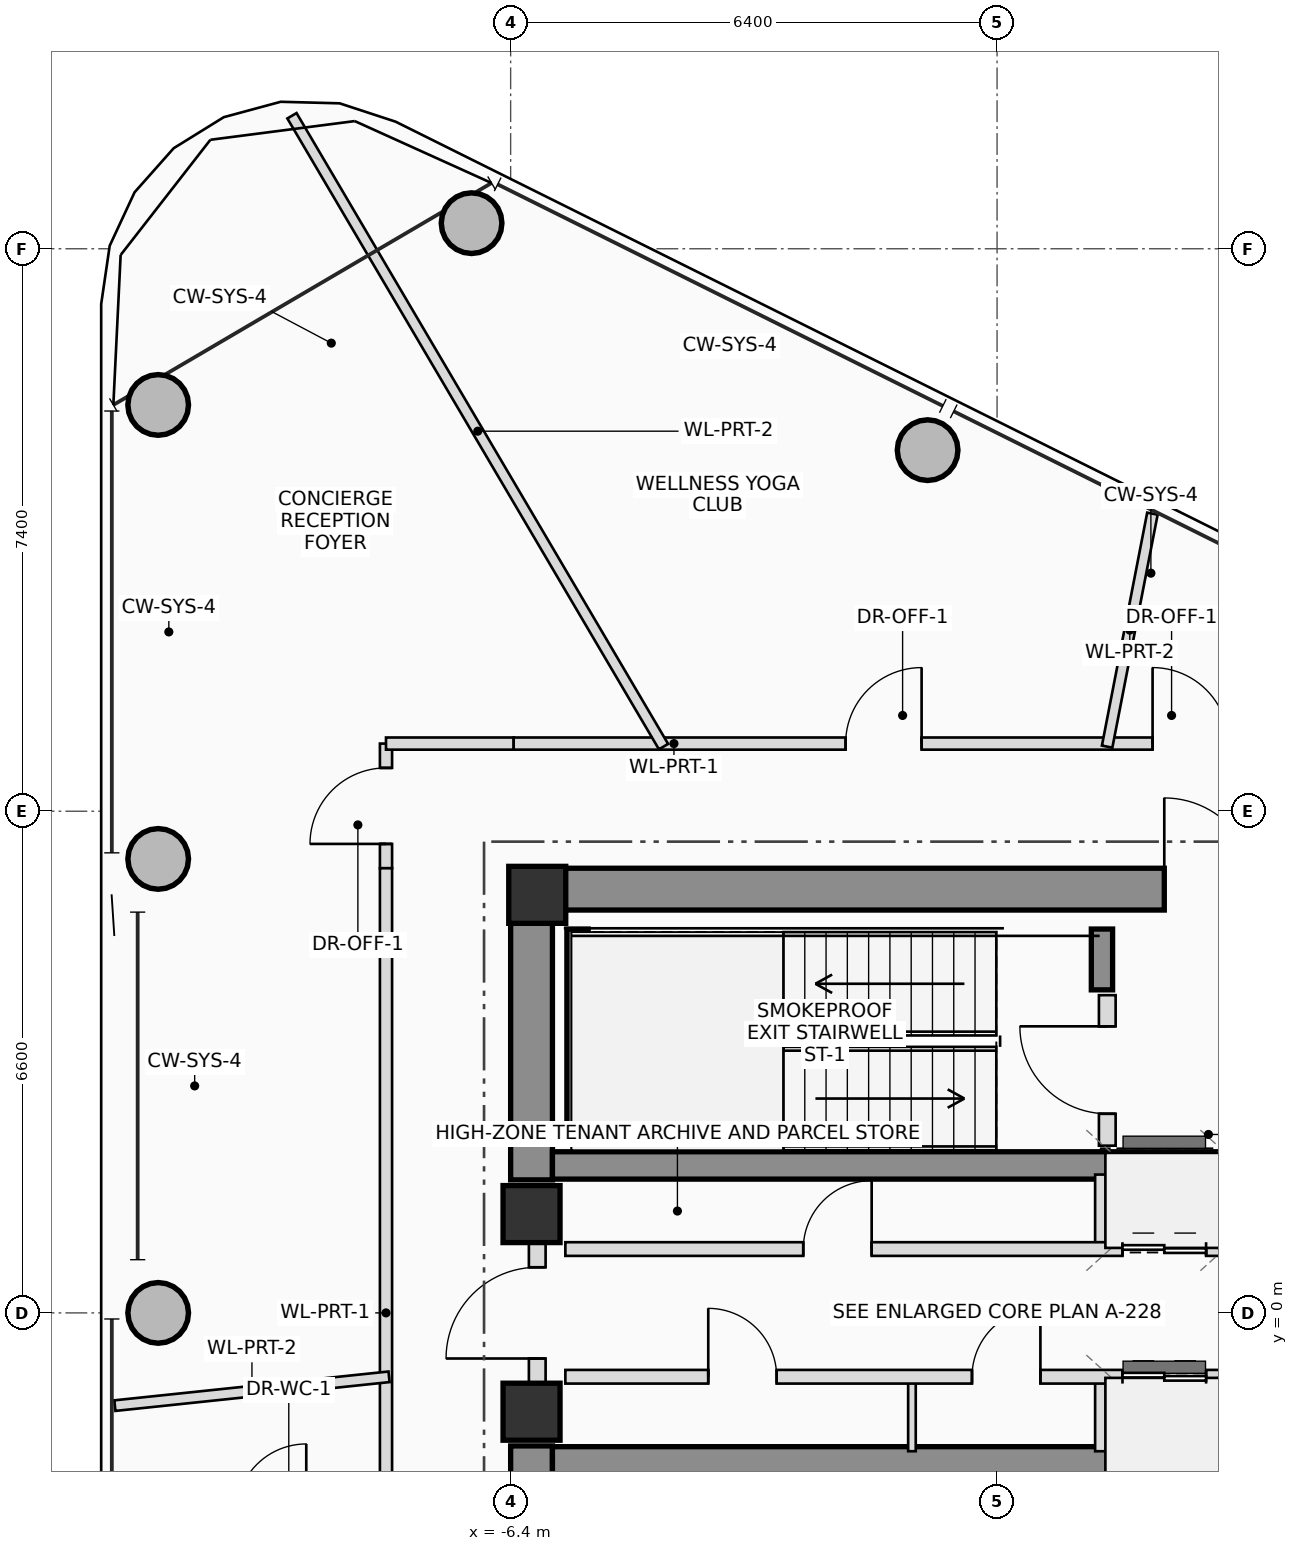
"""IFC4 building model, lengths in metres.
Left out: names, types, materials, properties, quantities, classifications, styles, units other than length and angle.
Written with IfcOpenShell. Run it as: python <this file> out.ifc"""

import sys

from ifc_helpers import new_model, si_unit, direction, frame, frame_2d, origin, origin_2d, place, context, subcontext, project, spatial, rectangle, hollow_circle, extrude, source, transform, mapped, element, fill, save


model = new_model("IFC4")
c1 = context("Model", 3, precision=1e-05, world=origin(), true_north=direction((0.0, 1.0)))
c2 = subcontext(c1, "Body", "Model", "MODEL_VIEW")
j1 = project(units=[si_unit("LENGTHUNIT", "METRE"), si_unit("PLANEANGLEUNIT", "RADIAN")], contexts=[c1])
p1 = place(None, origin())
s1 = spatial("IfcSite", under=j1, at=p1, CompositionType="ELEMENT")
p2 = place(p1, origin())
s2 = spatial("IfcBuilding", under=s1, at=p2, CompositionType="ELEMENT")
p3 = place(p2, frame((0.0, 0.0, 314.0)))
s3 = spatial("IfcBuildingStorey", under=s2, at=p3, CompositionType="ELEMENT", Elevation=314.0)
m1 = source(origin(), c2, "Body", "SweptSolid", [
    extrude(rectangle(XDim=0.75, YDim=0.75, at=origin_2d()), origin(), (0.0, 0.0, 1.0), 3.45),
])
p4 = place(p3, frame((-6.05, 5.5, 0.0), z_axis=(0.0, 0.0, 1.0), x_axis=(1.0, 0.0, 0.0)))
e1 = element("IfcColumn", 1, at=p4, inside=s3, PredefinedType="COLUMN", context=c2, shape_type="MappedRepresentation", body=[
    mapped(m1, transform((0.0, 0.0, 0.0), scale=1.0)),
])
p5 = place(p3, frame((-6.4, 5.575, 0.0), z_axis=(0.0, 0.0, 1.0), x_axis=(1.0, 0.0, 0.0)))
e2 = element("IfcWall", 2, at=p5, inside=s3, PredefinedType="SHEAR", context=c2, shape_type="SweptSolid", body=[
    extrude(rectangle(XDim=12.8, YDim=0.55, at=frame_2d((6.4, 0.0))), origin(), (0.0, 0.0, 1.0), 3.45),
])
p6 = place(p5, frame((8.6, 0.0, 0.0)))
e3 = element("IfcOpeningElement", 3, at=p6, cuts=e2, PredefinedType="OPENING", context=c2, shape_type="SweptSolid", body=[
    extrude(rectangle(XDim=1.2, YDim=2.2, at=frame_2d((0.6, 1.1))), frame((0.0, 0.285, 0.0), z_axis=(0.0, -1.0, 0.0), x_axis=(1.0, 0.0, 0.0)), (0.0, 0.0, 1.0), 0.57),
])
for number, where, z_axis, x_axis in (
    (4, (-6.125, -5.3, 0.0), (0.0, 0.0, 1.0), (0.0, 1.0, 0.0)),
    (5, (-6.125, 1.75, 0.0), (0.0, 0.0, 1.0), (0.0, 1.0, 0.0)),
):
    element("IfcWall", number, at=place(p3, frame(where, z_axis=z_axis, x_axis=x_axis)), inside=s3, PredefinedType="SHEAR", context=c2, shape_type="SweptSolid", body=[
        extrude(rectangle(XDim=3.55, YDim=0.55, at=frame_2d((1.775, 0.0))), origin(), (0.0, 0.0, 1.0), 3.45),
    ])
for number, where, z_axis, x_axis in (
    (6, (-5.85, 1.94, 0.0), (0.0, 0.0, 1.0), (1.0, 0.0, 0.0)),
    (7, (-5.85, -1.94, 0.0), (0.0, 0.0, 1.0), (1.0, 0.0, 0.0)),
):
    element("IfcWall", number, at=place(p3, frame(where, z_axis=z_axis, x_axis=x_axis)), inside=s3, PredefinedType="SHEAR", context=c2, shape_type="SweptSolid", body=[
        extrude(rectangle(XDim=11.7, YDim=0.36, at=frame_2d((5.85, 0.0))), origin(), (0.0, 0.0, 1.0), 3.45),
    ])
p7 = place(p3, frame((-5.52, 2.3, 0.0), z_axis=(0.0, 0.0, 1.0), x_axis=(0.0, 1.0, 0.0)))
e8 = element("IfcWall", 8, at=p7, inside=s3, PredefinedType="SHEAR", context=c2, shape_type="SweptSolid", body=[
    extrude(rectangle(XDim=2.75, YDim=0.28, at=frame_2d((1.375, 0.0))), origin(), (0.0, 0.0, 1.0), 3.45),
])
p8 = place(p3, frame((1.38, 4.25, 0.0), z_axis=(0.0, 0.0, 1.0), x_axis=(0.0, 1.0, 0.0)))
e9 = element("IfcWall", 9, at=p8, inside=s3, PredefinedType="SHEAR", context=c2, shape_type="SweptSolid", body=[
    extrude(rectangle(XDim=0.8, YDim=0.28, at=frame_2d((0.4, 0.0))), origin(), (0.0, 0.0, 1.0), 3.45),
])
for number, where, z_axis, x_axis in (
    (10, (-6.125, -1.3, 0.0), (0.0, 0.0, 1.0), (1.0, 0.0, 0.0)),
    (11, (-6.125, 1.3, 0.0), (0.0, 0.0, 1.0), (1.0, 0.0, 0.0)),
):
    element("IfcColumn", number, at=place(p3, frame(where, z_axis=z_axis, x_axis=x_axis)), inside=s3, PredefinedType="COLUMN", context=c2, shape_type="MappedRepresentation", body=[
        mapped(m1, transform((0.0, 0.0, 0.0), scale=1.0)),
    ])
m2 = source(origin(), c2, "Body", "SweptSolid", [
    extrude(hollow_circle(Radius=0.4, WallThickness=0.028, at=origin_2d()), origin(), (0.0, 0.0, 1.0), 3.19),
])
for number, where, z_axis, x_axis in (
    (12, (-0.914, 11.35, 0.0), (0.0, 0.0, 1.0), (1.0, 0.0, 0.0)),
    (13, (-6.914, 14.337, 0.0), (0.0, 0.0, 1.0), (1.0, 0.0, 0.0)),
    (14, (-11.037, 11.945, 0.0), (0.0, 0.0, 1.0), (1.0, 0.0, 0.0)),
    (15, (-11.037, 5.973, 0.0), (0.0, 0.0, 1.0), (1.0, 0.0, 0.0)),
    (16, (-11.037, 0.0, 0.0), (0.0, 0.0, 1.0), (1.0, 0.0, 0.0)),
):
    element("IfcColumn", number, at=place(p3, frame(where, z_axis=z_axis, x_axis=x_axis)), inside=s3, PredefinedType="COLUMN", context=c2, shape_type="MappedRepresentation", body=[
        mapped(m2, transform((0.0, 0.0, 0.0), scale=1.0)),
    ])
p9 = place(p3, frame((-6.05, -0.95, 0.0), z_axis=(0.0, 0.0, 1.0), x_axis=(0.0, 1.0, 0.0)))
e17 = element("IfcWall", 17, at=p9, inside=s3, PredefinedType="PLUMBINGWALL", context=c2, shape_type="SweptSolid", body=[
    extrude(rectangle(XDim=1.9, YDim=0.22, at=frame_2d((0.95, 0.0))), origin(), (0.0, 0.0, 1.0), 2.15),
])
p10 = place(p9, frame((0.35, 0.0, 0.0)))
e18 = element("IfcOpeningElement", 18, at=p10, cuts=e17, PredefinedType="OPENING", context=c2, shape_type="SweptSolid", body=[
    extrude(rectangle(XDim=1.2, YDim=2.2, at=frame_2d((0.6, 1.1))), frame((0.0, 0.12, 0.0), z_axis=(0.0, -1.0, 0.0), x_axis=(1.0, 0.0, 0.0)), (0.0, 0.0, 1.0), 0.24),
])
p11 = place(p3, frame((1.45, 2.2, 0.0), z_axis=(0.0, 0.0, 1.0), x_axis=(0.0, 1.0, 0.0)))
e19 = element("IfcWall", 19, at=p11, inside=s3, PredefinedType="PLUMBINGWALL", context=c2, shape_type="SweptSolid", body=[
    extrude(rectangle(XDim=1.98, YDim=0.22, at=frame_2d((0.99, 0.0))), origin(), (0.0, 0.0, 1.0), 3.17),
])
p12 = place(p11, frame((0.42, 0.0, 0.0)))
e20 = element("IfcOpeningElement", 20, at=p12, cuts=e19, PredefinedType="OPENING", context=c2, shape_type="SweptSolid", body=[
    extrude(rectangle(XDim=1.15, YDim=2.15, at=frame_2d((0.575, 1.075))), frame((0.0, 0.12, 0.0), z_axis=(0.0, -1.0, 0.0), x_axis=(1.0, 0.0, 0.0)), (0.0, 0.0, 1.0), 0.24),
])
p13 = place(p3, frame((-1.12, -1.82, 0.0), z_axis=(0.0, 0.0, 1.0), x_axis=(0.0, 1.0, 0.0)))
e21 = element("IfcWall", 21, at=p13, inside=s3, PredefinedType="PARTITIONING", context=c2, shape_type="SweptSolid", body=[
    extrude(rectangle(XDim=0.98, YDim=0.1, at=frame_2d((0.49, 0.0))), origin(), (0.0, 0.0, 1.0), 3.17),
])
for number, where, z_axis, x_axis in (
    (22, (1.38, 0.84, 0.0), (0.0, 0.0, 1.0), (0.0, 1.0, 0.0)),
    (23, (1.38, -1.82, 0.0), (0.0, 0.0, 1.0), (0.0, 1.0, 0.0)),
):
    element("IfcWall", number, at=place(p3, frame(where, z_axis=z_axis, x_axis=x_axis)), inside=s3, PredefinedType="PLUMBINGWALL", context=c2, shape_type="SweptSolid", body=[
        extrude(rectangle(XDim=0.98, YDim=0.18, at=frame_2d((0.49, 0.0))), origin(), (0.0, 0.0, 1.0), 3.17),
    ])
p14 = place(p3, frame((-5.68, 0.84, 0.0), z_axis=(0.0, 0.0, 1.0), x_axis=(1.0, 0.0, 0.0)))
e24 = element("IfcWall", 24, at=p14, inside=s3, PredefinedType="PLUMBINGWALL", context=c2, shape_type="SweptSolid", body=[
    extrude(rectangle(XDim=11.33, YDim=0.18, at=frame_2d((5.665, 0.0))), origin(), (0.0, 0.0, 1.0), 3.17),
])
p15 = place(p14, frame((3.13, 0.0, 0.0)))
e25 = element("IfcOpeningElement", 25, at=p15, cuts=e24, PredefinedType="OPENING", context=c2, shape_type="SweptSolid", body=[
    extrude(rectangle(XDim=0.9, YDim=2.05, at=frame_2d((0.45, 1.025))), frame((0.0, 0.1, 0.0), z_axis=(0.0, -1.0, 0.0), x_axis=(1.0, 0.0, 0.0)), (0.0, 0.0, 1.0), 0.2),
])
p16 = place(p14, frame((7.33, 0.0, 0.0)))
e26 = element("IfcOpeningElement", 26, at=p16, cuts=e24, PredefinedType="OPENING", context=c2, shape_type="SweptSolid", body=[
    extrude(rectangle(XDim=1.1, YDim=2.2, at=frame_2d((0.55, 1.1))), frame((0.0, 0.1, 0.0), z_axis=(0.0, -1.0, 0.0), x_axis=(1.0, 0.0, 0.0)), (0.0, 0.0, 1.0), 0.2),
])
p17 = place(p14, frame((8.83, 0.0, 0.0)))
e27 = element("IfcOpeningElement", 27, at=p17, cuts=e24, PredefinedType="OPENING", context=c2, shape_type="SweptSolid", body=[
    extrude(rectangle(XDim=1.1, YDim=2.2, at=frame_2d((0.55, 1.1))), frame((0.0, 0.1, 0.0), z_axis=(0.0, -1.0, 0.0), x_axis=(1.0, 0.0, 0.0)), (0.0, 0.0, 1.0), 0.2),
])
p18 = place(p3, frame((-5.68, -0.84, 0.0), z_axis=(0.0, 0.0, 1.0), x_axis=(1.0, 0.0, 0.0)))
e28 = element("IfcWall", 28, at=p18, inside=s3, PredefinedType="PLUMBINGWALL", context=c2, shape_type="SweptSolid", body=[
    extrude(rectangle(XDim=10.22, YDim=0.18, at=frame_2d((5.11, 0.0))), origin(), (0.0, 0.0, 1.0), 3.17),
])
p19 = place(p18, frame((1.88, 0.0, 0.0)))
e29 = element("IfcOpeningElement", 29, at=p19, cuts=e28, PredefinedType="OPENING", context=c2, shape_type="SweptSolid", body=[
    extrude(rectangle(XDim=0.9, YDim=2.05, at=frame_2d((0.45, 1.025))), frame((0.0, 0.1, 0.0), z_axis=(0.0, -1.0, 0.0), x_axis=(1.0, 0.0, 0.0)), (0.0, 0.0, 1.0), 0.2),
])
p20 = place(p18, frame((5.35, 0.0, 0.0)))
e30 = element("IfcOpeningElement", 30, at=p20, cuts=e28, PredefinedType="OPENING", context=c2, shape_type="SweptSolid", body=[
    extrude(rectangle(XDim=0.9, YDim=2.05, at=frame_2d((0.45, 1.025))), frame((0.0, 0.1, 0.0), z_axis=(0.0, -1.0, 0.0), x_axis=(1.0, 0.0, 0.0)), (0.0, 0.0, 1.0), 0.2),
])
p21 = place(p18, frame((7.33, 0.0, 0.0)))
e31 = element("IfcOpeningElement", 31, at=p21, cuts=e28, PredefinedType="OPENING", context=c2, shape_type="SweptSolid", body=[
    extrude(rectangle(XDim=1.1, YDim=2.2, at=frame_2d((0.55, 1.1))), frame((0.0, 0.1, 0.0), z_axis=(0.0, -1.0, 0.0), x_axis=(1.0, 0.0, 0.0)), (0.0, 0.0, 1.0), 0.2),
])
p22 = place(p18, frame((9.02, 0.0, 0.0)))
e32 = element("IfcOpeningElement", 32, at=p22, cuts=e28, PredefinedType="OPENING", context=c2, shape_type="SweptSolid", body=[
    extrude(rectangle(XDim=0.9, YDim=2.05, at=frame_2d((0.45, 1.025))), frame((0.0, 0.1, 0.0), z_axis=(0.0, -1.0, 0.0), x_axis=(1.0, 0.0, 0.0)), (0.0, 0.0, 1.0), 0.2),
])
p23 = place(p3, frame((-8.04, 5.85, 0.0), z_axis=(0.0, 0.0, 1.0), x_axis=(0.0, 1.0, 0.0)))
e33 = element("IfcWall", 33, at=p23, inside=s3, PredefinedType="PARTITIONING", context=c2, shape_type="SweptSolid", body=[
    extrude(rectangle(XDim=1.64, YDim=0.16, at=frame_2d((0.82, 0.0))), origin(), (0.0, 0.0, 1.0), 2.825),
])
p24 = place(p23, frame((0.32, 0.0, 0.0)))
e34 = element("IfcOpeningElement", 34, at=p24, cuts=e33, PredefinedType="OPENING", context=c2, shape_type="SweptSolid", body=[
    extrude(rectangle(XDim=1.0, YDim=2.25, at=frame_2d((0.5, 1.125))), frame((0.0, 0.09, 0.0), z_axis=(0.0, -1.0, 0.0), x_axis=(1.0, 0.0, 0.0)), (0.0, 0.0, 1.0), 0.18),
])
p25 = place(p3, frame((-8.04, 7.49, 0.0), z_axis=(0.0, 0.0, 1.0), x_axis=(1.0, 0.0, 0.0)))
e35 = element("IfcWall", 35, at=p25, inside=s3, PredefinedType="PARTITIONING", context=c2, shape_type="SweptSolid", body=[
    extrude(rectangle(XDim=1.68, YDim=0.16, at=frame_2d((0.84, 0.0))), origin(), (0.0, 0.0, 1.0), 2.575),
])
p26 = place(p3, frame((-6.36, 7.49, 0.0), z_axis=(0.0, 0.0, 1.0), x_axis=(1.0, 0.0, 0.0)))
e36 = element("IfcWall", 36, at=p26, inside=s3, PredefinedType="PARTITIONING", context=c2, shape_type="SweptSolid", body=[
    extrude(rectangle(XDim=9.679, YDim=0.16, at=frame_2d((4.84, 0.0))), origin(), (0.0, 0.0, 1.0), 2.575),
])
p27 = place(p26, frame((4.367, 0.0, 0.0)))
e37 = element("IfcOpeningElement", 37, at=p27, cuts=e36, PredefinedType="OPENING", context=c2, shape_type="SweptSolid", body=[
    extrude(rectangle(XDim=1.0, YDim=2.25, at=frame_2d((0.5, 1.125))), frame((0.0, 0.09, 0.0), z_axis=(0.0, -1.0, 0.0), x_axis=(1.0, 0.0, 0.0)), (0.0, 0.0, 1.0), 0.18),
])
p28 = place(p26, frame((8.406, 0.0, 0.0)))
e38 = element("IfcOpeningElement", 38, at=p28, cuts=e36, PredefinedType="OPENING", context=c2, shape_type="SweptSolid", body=[
    extrude(rectangle(XDim=1.0, YDim=2.25, at=frame_2d((0.5, 1.125))), frame((0.0, 0.09, 0.0), z_axis=(0.0, -1.0, 0.0), x_axis=(1.0, 0.0, 0.0)), (0.0, 0.0, 1.0), 0.18),
])
p29 = place(p3, frame((-8.04, -5.85, 0.0), z_axis=(0.0, 0.0, 1.0), x_axis=(0.0, 1.0, 0.0)))
e39 = element("IfcWall", 39, at=p29, inside=s3, PredefinedType="PARTITIONING", context=c2, shape_type="SweptSolid", body=[
    extrude(rectangle(XDim=11.7, YDim=0.16, at=frame_2d((5.85, 0.0))), origin(), (0.0, 0.0, 1.0), 2.575),
])
p30 = place(p3, frame((1.448, 7.45, 0.0), z_axis=(0.0, 0.0, 1.0), x_axis=(0.190865473384, 0.981616203549, 0.0)))
e40 = element("IfcWall", 40, at=p30, inside=s3, PredefinedType="PARTITIONING", context=c2, shape_type="SweptSolid", body=[
    extrude(rectangle(XDim=3.122, YDim=0.14, at=frame_2d((1.561, 0.0))), origin(), (0.0, 0.0, 1.0), 2.735),
])
p31 = place(p3, frame((-4.388, 7.45, 0.0), z_axis=(0.0, 0.0, 1.0), x_axis=(-0.507535081803, 0.861631093183, 0.0)))
e41 = element("IfcWall", 41, at=p31, inside=s3, PredefinedType="PARTITIONING", context=c2, shape_type="SweptSolid", body=[
    extrude(rectangle(XDim=9.633, YDim=0.14, at=frame_2d((4.816, 0.0))), origin(), (0.0, 0.0, 1.0), 2.575),
])
p32 = place(p3, frame((-8.0, -0.841, 0.0), z_axis=(0.0, 0.0, 1.0), x_axis=(-0.994522036567, -0.104527119842, 0.0)))
e42 = element("IfcWall", 42, at=p32, inside=s3, PredefinedType="PARTITIONING", context=c2, shape_type="SweptSolid", body=[
    extrude(rectangle(XDim=3.627, YDim=0.14, at=frame_2d((1.813, 0.0))), origin(), (0.0, 0.0, 1.0), 2.575),
])
p33 = place(p6, origin())
e43 = element("IfcDoor", 43, at=p33, inside=s3, OperationType="SINGLE_SWING_LEFT", PredefinedType="DOOR", context=c2, shape_type="SweptSolid", body=[
    extrude(rectangle(XDim=1.2, YDim=2.2, at=frame_2d((0.6, 1.1))), frame((0.0, 0.025, 0.0), z_axis=(0.0, -1.0, 0.0), x_axis=(1.0, 0.0, 0.0)), (0.0, 0.0, 1.0), 0.05),
])
fill(e3, e43)
p34 = place(p10, origin())
e44 = element("IfcDoor", 44, at=p34, inside=s3, OperationType="SINGLE_SWING_LEFT", PredefinedType="DOOR", context=c2, shape_type="SweptSolid", body=[
    extrude(rectangle(XDim=1.2, YDim=2.2, at=frame_2d((0.6, 1.1))), frame((0.0, 0.025, 0.0), z_axis=(0.0, -1.0, 0.0), x_axis=(1.0, 0.0, 0.0)), (0.0, 0.0, 1.0), 0.05),
])
fill(e18, e44)
p35 = place(p12, origin())
e45 = element("IfcDoor", 45, at=p35, inside=s3, OperationType="SINGLE_SWING_RIGHT", PredefinedType="DOOR", context=c2, shape_type="SweptSolid", body=[
    extrude(rectangle(XDim=1.15, YDim=2.15, at=frame_2d((0.575, 1.075))), frame((0.0, 0.025, 0.0), z_axis=(0.0, -1.0, 0.0), x_axis=(1.0, 0.0, 0.0)), (0.0, 0.0, 1.0), 0.05),
])
fill(e20, e45)
p36 = place(p15, origin())
e46 = element("IfcDoor", 46, at=p36, inside=s3, OperationType="SINGLE_SWING_RIGHT", PredefinedType="DOOR", context=c2, shape_type="SweptSolid", body=[
    extrude(rectangle(XDim=0.9, YDim=2.05, at=frame_2d((0.45, 1.025))), frame((0.0, 0.025, 0.0), z_axis=(0.0, -1.0, 0.0), x_axis=(1.0, 0.0, 0.0)), (0.0, 0.0, 1.0), 0.05),
])
fill(e25, e46)
p37 = place(p16, origin())
e47 = element("IfcDoor", 47, at=p37, inside=s3, OperationType="DOUBLE_DOOR_SLIDING", PredefinedType="DOOR", context=c2, shape_type="SweptSolid", body=[
    extrude(rectangle(XDim=1.1, YDim=2.2, at=frame_2d((0.55, 1.1))), frame((0.0, 0.025, 0.0), z_axis=(0.0, -1.0, 0.0), x_axis=(1.0, 0.0, 0.0)), (0.0, 0.0, 1.0), 0.05),
])
fill(e26, e47)
p38 = place(p19, origin())
e48 = element("IfcDoor", 48, at=p38, inside=s3, OperationType="SINGLE_SWING_LEFT", PredefinedType="DOOR", context=c2, shape_type="SweptSolid", body=[
    extrude(rectangle(XDim=0.9, YDim=2.05, at=frame_2d((0.45, 1.025))), frame((0.0, 0.025, 0.0), z_axis=(0.0, -1.0, 0.0), x_axis=(1.0, 0.0, 0.0)), (0.0, 0.0, 1.0), 0.05),
])
fill(e29, e48)
p39 = place(p20, origin())
e49 = element("IfcDoor", 49, at=p39, inside=s3, OperationType="SINGLE_SWING_RIGHT", PredefinedType="DOOR", context=c2, shape_type="SweptSolid", body=[
    extrude(rectangle(XDim=0.9, YDim=2.05, at=frame_2d((0.45, 1.025))), frame((0.0, 0.025, 0.0), z_axis=(0.0, -1.0, 0.0), x_axis=(1.0, 0.0, 0.0)), (0.0, 0.0, 1.0), 0.05),
])
fill(e30, e49)
p40 = place(p21, origin())
e50 = element("IfcDoor", 50, at=p40, inside=s3, OperationType="DOUBLE_DOOR_SLIDING", PredefinedType="DOOR", context=c2, shape_type="SweptSolid", body=[
    extrude(rectangle(XDim=1.1, YDim=2.2, at=frame_2d((0.55, 1.1))), frame((0.0, 0.025, 0.0), z_axis=(0.0, -1.0, 0.0), x_axis=(1.0, 0.0, 0.0)), (0.0, 0.0, 1.0), 0.05),
])
fill(e31, e50)
p41 = place(p24, origin())
e51 = element("IfcDoor", 51, at=p41, inside=s3, OperationType="SINGLE_SWING_LEFT", PredefinedType="DOOR", context=c2, shape_type="SweptSolid", body=[
    extrude(rectangle(XDim=1.0, YDim=2.25, at=frame_2d((0.5, 1.125))), frame((0.0, 0.025, 0.0), z_axis=(0.0, -1.0, 0.0), x_axis=(1.0, 0.0, 0.0)), (0.0, 0.0, 1.0), 0.05),
])
fill(e34, e51)
p42 = place(p27, origin())
e52 = element("IfcDoor", 52, at=p42, inside=s3, OperationType="SINGLE_SWING_RIGHT", PredefinedType="DOOR", context=c2, shape_type="SweptSolid", body=[
    extrude(rectangle(XDim=1.0, YDim=2.25, at=frame_2d((0.5, 1.125))), frame((0.0, 0.025, 0.0), z_axis=(0.0, -1.0, 0.0), x_axis=(1.0, 0.0, 0.0)), (0.0, 0.0, 1.0), 0.05),
])
fill(e37, e52)
p43 = place(p28, origin())
e53 = element("IfcDoor", 53, at=p43, inside=s3, OperationType="SINGLE_SWING_LEFT", PredefinedType="DOOR", context=c2, shape_type="SweptSolid", body=[
    extrude(rectangle(XDim=1.0, YDim=2.25, at=frame_2d((0.5, 1.125))), frame((0.0, 0.025, 0.0), z_axis=(0.0, -1.0, 0.0), x_axis=(1.0, 0.0, 0.0)), (0.0, 0.0, 1.0), 0.05),
])
fill(e38, e53)
save(model, sys.argv[1])
